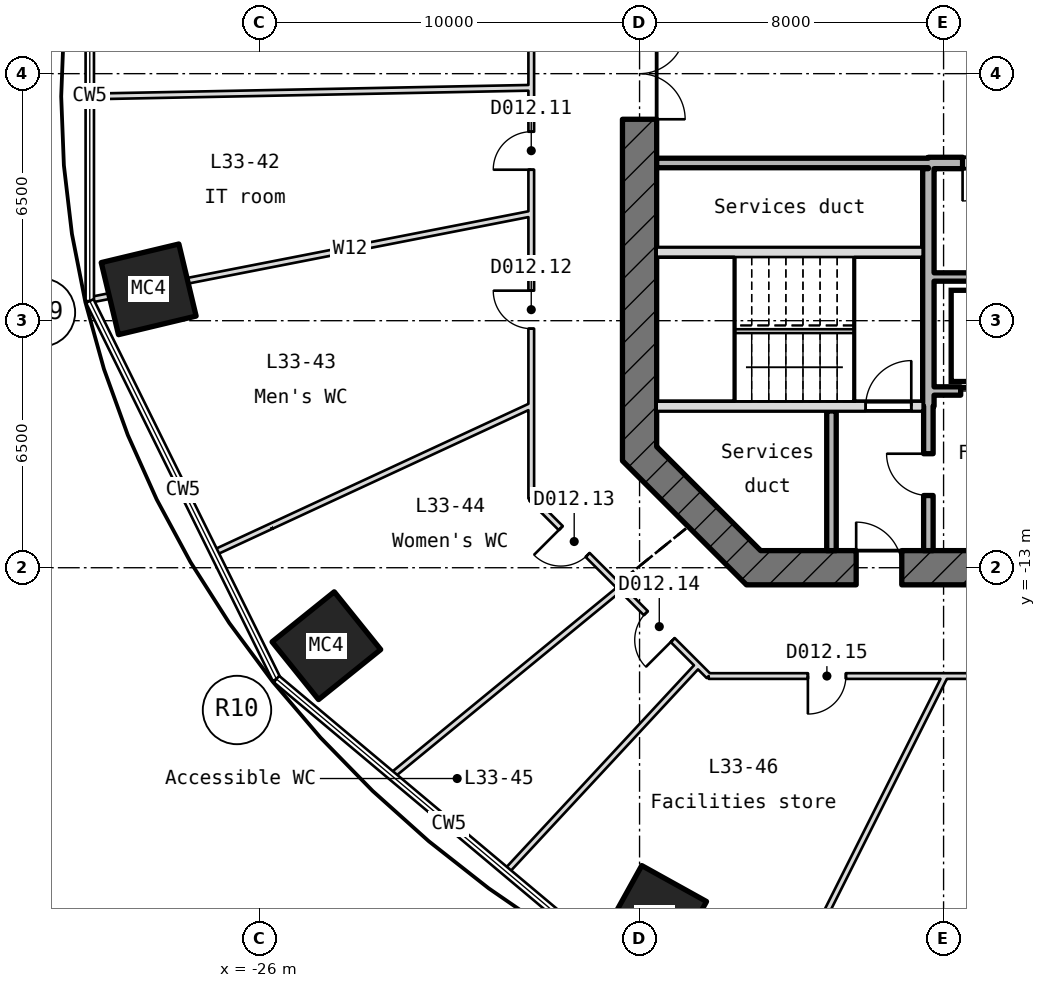
"""IFC4 building model, lengths in metres.
Left out: names, types, materials, properties, quantities, classifications, styles, units other than length and angle.
Written with IfcOpenShell. Run it as: python <this file> out.ifc"""

import sys

from ifc_helpers import new_model, si_unit, direction, frame, frame_2d, origin, origin_2d, place, context, subcontext, project, spatial, rectangle, hollow_rectangle, extrude, element, fill, save


model = new_model("IFC4")
c1 = context("Model", 3, precision=1e-05, world=origin(), true_north=direction((0.0, 1.0)))
c2 = subcontext(c1, "Body", "Model", "MODEL_VIEW")
j1 = project(units=[si_unit("LENGTHUNIT", "METRE"), si_unit("PLANEANGLEUNIT", "RADIAN")], contexts=[c1])
p1 = place(None, origin())
s1 = spatial("IfcSite", under=j1, at=p1, CompositionType="ELEMENT")
p2 = place(p1, origin())
s2 = spatial("IfcBuilding", under=s1, at=p2, CompositionType="ELEMENT")
p3 = place(p2, frame((0.0, 0.0, 155.65)))
s3 = spatial("IfcBuildingStorey", under=s2, at=p3, CompositionType="ELEMENT", Elevation=155.65)
for number, where, z_axis, x_axis in (
    (1, (-28.917, -5.675, -0.25), (0.0, 0.0, 1.0), (-0.233, 0.972, 0.0)),
    (2, (-24.241, -15.052, -0.25), (0.0, 0.0, 1.0), (-0.627, 0.779, 0.0)),
    (3, (-15.6, -22.228, -0.25), (0.0, 0.0, 1.0), (-0.874, 0.485, 0.0)),
):
    element("IfcColumn", number, at=place(p3, frame(where, z_axis=z_axis, x_axis=x_axis)), inside=s3, PredefinedType="COLUMN", context=c2, shape_type="SweptSolid", body=[
        extrude(hollow_rectangle(XDim=1.95, YDim=2.1, WallThickness=0.075, at=origin_2d()), origin(), (0.0, 0.0, 1.0), 5.47),
    ])
p4 = place(p3, frame((-16.0, 10.186, -0.25), z_axis=(0.0, 0.0, 1.0), x_axis=(0.0, -1.0, 0.0)))
e4 = element("IfcWall", 4, at=p4, inside=s3, PredefinedType="SHEAR", context=c2, shape_type="SweptSolid", body=[
    extrude(rectangle(XDim=20.373, YDim=0.9, at=frame_2d((10.186, 0.0))), origin(), (0.0, 0.0, 1.0), 5.47),
])
p5 = place(p4, frame((8.986, 0.0, 0.25)))
e5 = element("IfcOpeningElement", 5, at=p5, cuts=e4, PredefinedType="OPENING", context=c2, shape_type="SweptSolid", body=[
    extrude(rectangle(XDim=2.4, YDim=2.1, at=frame_2d((1.2, 1.05))), frame((0.0, 0.46, 0.0), z_axis=(0.0, -1.0, 0.0), x_axis=(1.0, 0.0, 0.0)), (0.0, 0.0, 1.0), 0.92),
])
p6 = place(p4, frame((5.586, 0.0, 0.25)))
e6 = element("IfcOpeningElement", 6, at=p6, cuts=e4, PredefinedType="OPENING", context=c2, shape_type="SweptSolid", body=[
    extrude(rectangle(XDim=1.2, YDim=2.1, at=frame_2d((0.6, 1.05))), frame((0.0, 0.46, 0.0), z_axis=(0.0, -1.0, 0.0), x_axis=(1.0, 0.0, 0.0)), (0.0, 0.0, 1.0), 0.92),
])
p7 = place(p3, frame((-16.132, -9.868, -0.25), z_axis=(0.0, 0.0, 1.0), x_axis=(0.707106781187, -0.707106781187, 0.0)))
e7 = element("IfcWall", 7, at=p7, inside=s3, PredefinedType="SHEAR", context=c2, shape_type="SweptSolid", body=[
    extrude(rectangle(XDim=4.615, YDim=0.9, at=frame_2d((2.308, 0.0))), origin(), (0.0, 0.0, 1.0), 5.47),
])
p8 = place(p3, frame((-13.186, -13.0, -0.25), z_axis=(0.0, 0.0, 1.0), x_axis=(1.0, 0.0, 0.0)))
e8 = element("IfcWall", 8, at=p8, inside=s3, PredefinedType="SHEAR", context=c2, shape_type="SweptSolid", body=[
    extrude(rectangle(XDim=26.373, YDim=0.9, at=frame_2d((13.186, 0.0))), origin(), (0.0, 0.0, 1.0), 5.47),
])
p9 = place(p8, frame((2.886, 0.0, 0.25)))
e9 = element("IfcOpeningElement", 9, at=p9, cuts=e8, PredefinedType="OPENING", context=c2, shape_type="SweptSolid", body=[
    extrude(rectangle(XDim=1.2, YDim=2.1, at=frame_2d((0.6, 1.05))), frame((0.0, 0.46, 0.0), z_axis=(0.0, -1.0, 0.0), x_axis=(1.0, 0.0, 0.0)), (0.0, 0.0, 1.0), 0.92),
])
p10 = place(p8, frame((6.886, 0.0, 0.25)))
e10 = element("IfcOpeningElement", 10, at=p10, cuts=e8, PredefinedType="OPENING", context=c2, shape_type="SweptSolid", body=[
    extrude(rectangle(XDim=1.4, YDim=2.1, at=frame_2d((0.7, 1.05))), frame((0.0, 0.46, 0.0), z_axis=(0.0, -1.0, 0.0), x_axis=(1.0, 0.0, 0.0)), (0.0, 0.0, 1.0), 0.92),
])
p11 = place(p8, frame((15.486, 0.0, 0.25)))
e11 = element("IfcOpeningElement", 11, at=p11, cuts=e8, PredefinedType="OPENING", context=c2, shape_type="SweptSolid", body=[
    extrude(rectangle(XDim=1.4, YDim=2.1, at=frame_2d((0.7, 1.05))), frame((0.0, 0.46, 0.0), z_axis=(0.0, -1.0, 0.0), x_axis=(1.0, 0.0, 0.0)), (0.0, 0.0, 1.0), 0.92),
])
p12 = place(p3, frame((-15.55, -8.75, -0.25), z_axis=(0.0, 0.0, 1.0), x_axis=(1.0, 0.0, 0.0)))
e12 = element("IfcWall", 12, at=p12, inside=s3, PredefinedType="SHEAR", context=c2, shape_type="SweptSolid", body=[
    extrude(rectangle(XDim=7.0, YDim=0.25, at=frame_2d((3.5, 0.0))), origin(), (0.0, 0.0, 1.0), 5.47),
])
p13 = place(p12, frame((5.5, 0.0, 0.25)))
e13 = element("IfcOpeningElement", 13, at=p13, cuts=e12, PredefinedType="OPENING", context=c2, shape_type="SweptSolid", body=[
    extrude(rectangle(XDim=1.2, YDim=2.1, at=frame_2d((0.6, 1.05))), frame((0.0, 0.135, 0.0), z_axis=(0.0, -1.0, 0.0), x_axis=(1.0, 0.0, 0.0)), (0.0, 0.0, 1.0), 0.27),
])
p14 = place(p3, frame((-8.25, -8.35, 0.0), z_axis=(0.0, 0.0, 1.0), x_axis=(1.0, 0.0, 0.0)))
e14 = element("IfcWall", 14, at=p14, inside=s3, PredefinedType="STANDARD", context=c2, shape_type="SweptSolid", body=[
    extrude(rectangle(XDim=5.34, YDim=0.22, at=frame_2d((2.67, 0.0))), origin(), (0.0, 0.0, 1.0), 5.22),
])
p15 = place(p14, frame((0.7, 0.0, 0.0)))
e15 = element("IfcOpeningElement", 15, at=p15, cuts=e14, PredefinedType="OPENING", context=c2, shape_type="SweptSolid", body=[
    extrude(rectangle(XDim=1.1, YDim=2.1, at=frame_2d((0.55, 1.05))), frame((0.0, 0.12, 0.0), z_axis=(0.0, -1.0, 0.0), x_axis=(1.0, 0.0, 0.0)), (0.0, 0.0, 1.0), 0.24),
])
p16 = place(p14, frame((3.5, 0.0, 0.0)))
e16 = element("IfcOpeningElement", 16, at=p16, cuts=e14, PredefinedType="OPENING", context=c2, shape_type="SweptSolid", body=[
    extrude(rectangle(XDim=1.1, YDim=2.1, at=frame_2d((0.55, 1.05))), frame((0.0, 0.12, 0.0), z_axis=(0.0, -1.0, 0.0), x_axis=(1.0, 0.0, 0.0)), (0.0, 0.0, 1.0), 0.24),
])
p17 = place(p3, frame((-8.25, -5.35, 0.0), z_axis=(0.0, 0.0, 1.0), x_axis=(1.0, 0.0, 0.0)))
e17 = element("IfcWall", 17, at=p17, inside=s3, PredefinedType="STANDARD", context=c2, shape_type="SweptSolid", body=[
    extrude(rectangle(XDim=16.5, YDim=0.22, at=frame_2d((8.25, 0.0))), origin(), (0.0, 0.0, 1.0), 5.22),
])
p18 = place(p3, frame((-15.55, -4.7, -0.25), z_axis=(0.0, 0.0, 1.0), x_axis=(1.0, 0.0, 0.0)))
e18 = element("IfcWall", 18, at=p18, inside=s3, PredefinedType="SHEAR", context=c2, shape_type="SweptSolid", body=[
    extrude(rectangle(XDim=7.0, YDim=0.25, at=frame_2d((3.5, 0.0))), origin(), (0.0, 0.0, 1.0), 5.47),
])
p19 = place(p3, frame((-15.55, -2.35, 0.0), z_axis=(0.0, 0.0, 1.0), x_axis=(1.0, 0.0, 0.0)))
e19 = element("IfcWall", 19, at=p19, inside=s3, PredefinedType="STANDARD", context=c2, shape_type="SweptSolid", body=[
    extrude(rectangle(XDim=7.15, YDim=0.25, at=frame_2d((3.575, 0.0))), origin(), (0.0, 0.0, 1.0), 5.22),
])
p20 = place(p3, frame((-8.4, -2.35, -0.25), z_axis=(0.0, 0.0, 1.0), x_axis=(1.0, 0.0, 0.0)))
e20 = element("IfcWall", 20, at=p20, inside=s3, PredefinedType="SHEAR", context=c2, shape_type="SweptSolid", body=[
    extrude(rectangle(XDim=16.8, YDim=0.3, at=frame_2d((8.4, 0.0))), origin(), (0.0, 0.0, 1.0), 5.47),
])
p21 = place(p20, frame((0.9, 0.0, 0.25)))
e21 = element("IfcOpeningElement", 21, at=p21, cuts=e20, PredefinedType="OPENING", context=c2, shape_type="SweptSolid", body=[
    extrude(rectangle(XDim=1.0, YDim=2.1, at=frame_2d((0.5, 1.05))), frame((0.0, 0.16, 0.0), z_axis=(0.0, -1.0, 0.0), x_axis=(1.0, 0.0, 0.0)), (0.0, 0.0, 1.0), 0.32),
])
p22 = place(p20, frame((14.9, 0.0, 0.25)))
e22 = element("IfcOpeningElement", 22, at=p22, cuts=e20, PredefinedType="OPENING", context=c2, shape_type="SweptSolid", body=[
    extrude(rectangle(XDim=1.0, YDim=2.1, at=frame_2d((0.5, 1.05))), frame((0.0, 0.16, 0.0), z_axis=(0.0, -1.0, 0.0), x_axis=(1.0, 0.0, 0.0)), (0.0, 0.0, 1.0), 0.32),
])
p23 = place(p3, frame((-10.95, -12.55, 0.0), z_axis=(0.0, 0.0, 1.0), x_axis=(0.0, 1.0, 0.0)))
e23 = element("IfcWall", 23, at=p23, inside=s3, PredefinedType="STANDARD", context=c2, shape_type="SweptSolid", body=[
    extrude(rectangle(XDim=3.675, YDim=0.25, at=frame_2d((1.837, 0.0))), origin(), (0.0, 0.0, 1.0), 5.22),
])
p24 = place(p3, frame((-8.4, -12.55, 0.0), z_axis=(0.0, 0.0, 1.0), x_axis=(0.0, 1.0, 0.0)))
e24 = element("IfcWall", 24, at=p24, inside=s3, PredefinedType="STANDARD", context=c2, shape_type="SweptSolid", body=[
    extrude(rectangle(XDim=3.8, YDim=0.25, at=frame_2d((1.9, 0.0))), origin(), (0.0, 0.0, 1.0), 5.22),
])
p25 = place(p24, frame((1.45, 0.0, 0.0)))
e25 = element("IfcOpeningElement", 25, at=p25, cuts=e24, PredefinedType="OPENING", context=c2, shape_type="SweptSolid", body=[
    extrude(rectangle(XDim=1.1, YDim=2.1, at=frame_2d((0.55, 1.05))), frame((0.0, 0.135, 0.0), z_axis=(0.0, -1.0, 0.0), x_axis=(1.0, 0.0, 0.0)), (0.0, 0.0, 1.0), 0.27),
])
p26 = place(p3, frame((-8.4, -8.75, -0.25), z_axis=(0.0, 0.0, 1.0), x_axis=(0.0, 1.0, 0.0)))
e26 = element("IfcWall", 26, at=p26, inside=s3, PredefinedType="SHEAR", context=c2, shape_type="SweptSolid", body=[
    extrude(rectangle(XDim=6.25, YDim=0.3, at=frame_2d((3.125, 0.0))), origin(), (0.0, 0.0, 1.0), 5.47),
])
p27 = place(p3, frame((-14.18, -15.85, 0.0), z_axis=(0.0, 0.0, 1.0), x_axis=(1.0, 0.0, 0.0)))
e27 = element("IfcWall", 27, at=p27, inside=s3, PredefinedType="PARTITIONING", context=c2, shape_type="SweptSolid", body=[
    extrude(rectangle(XDim=28.361, YDim=0.15, at=frame_2d((14.18, 0.0))), origin(), (0.0, 0.0, 1.0), 5.22),
])
p28 = place(p27, frame((2.61, 0.0, 0.0)))
e28 = element("IfcOpeningElement", 28, at=p28, cuts=e27, PredefinedType="OPENING", context=c2, shape_type="SweptSolid", body=[
    extrude(rectangle(XDim=1.0, YDim=2.1, at=frame_2d((0.5, 1.05))), frame((0.0, 0.085, 0.0), z_axis=(0.0, -1.0, 0.0), x_axis=(1.0, 0.0, 0.0)), (0.0, 0.0, 1.0), 0.17),
])
p29 = place(p27, frame((8.368, 0.0, 0.0)))
e29 = element("IfcOpeningElement", 29, at=p29, cuts=e27, PredefinedType="OPENING", context=c2, shape_type="SweptSolid", body=[
    extrude(rectangle(XDim=1.0, YDim=2.1, at=frame_2d((0.5, 1.05))), frame((0.0, 0.085, 0.0), z_axis=(0.0, -1.0, 0.0), x_axis=(1.0, 0.0, 0.0)), (0.0, 0.0, 1.0), 0.17),
])
p30 = place(p27, frame((13.475, 0.0, 0.0)))
e30 = element("IfcOpeningElement", 30, at=p30, cuts=e27, PredefinedType="OPENING", context=c2, shape_type="SweptSolid", body=[
    extrude(rectangle(XDim=1.0, YDim=2.1, at=frame_2d((0.5, 1.05))), frame((0.0, 0.085, 0.0), z_axis=(0.0, -1.0, 0.0), x_axis=(1.0, 0.0, 0.0)), (0.0, 0.0, 1.0), 0.17),
])
p31 = place(p27, frame((18.479, 0.0, 0.0)))
e31 = element("IfcOpeningElement", 31, at=p31, cuts=e27, PredefinedType="OPENING", context=c2, shape_type="SweptSolid", body=[
    extrude(rectangle(XDim=1.0, YDim=2.1, at=frame_2d((0.5, 1.05))), frame((0.0, 0.085, 0.0), z_axis=(0.0, -1.0, 0.0), x_axis=(1.0, 0.0, 0.0)), (0.0, 0.0, 1.0), 0.17),
])
p32 = place(p27, frame((24.443, 0.0, 0.0)))
e32 = element("IfcOpeningElement", 32, at=p32, cuts=e27, PredefinedType="OPENING", context=c2, shape_type="SweptSolid", body=[
    extrude(rectangle(XDim=1.0, YDim=2.1, at=frame_2d((0.5, 1.05))), frame((0.0, 0.085, 0.0), z_axis=(0.0, -1.0, 0.0), x_axis=(1.0, 0.0, 0.0)), (0.0, 0.0, 1.0), 0.17),
])
p33 = place(p3, frame((-30.447, -0.6, 0.0), z_axis=(0.0, 0.0, 1.0), x_axis=(0.999805915994, 0.019701023923, 0.0)))
e33 = element("IfcWall", 33, at=p33, inside=s3, PredefinedType="PARTITIONING", context=c2, shape_type="SweptSolid", body=[
    extrude(rectangle(XDim=11.599, YDim=0.15, at=frame_2d((5.8, 0.0))), origin(), (0.0, 0.0, 1.0), 5.22),
])
p34 = place(p3, frame((-11.767, -23.429, 0.0), z_axis=(0.0, 0.0, 1.0), x_axis=(0.448824965696, 0.893619689895, 0.0)))
e34 = element("IfcWall", 34, at=p34, inside=s3, PredefinedType="PARTITIONING", context=c2, shape_type="SweptSolid", body=[
    extrude(rectangle(XDim=8.481, YDim=0.15, at=frame_2d((4.24, 0.0))), origin(), (0.0, 0.0, 1.0), 4.684),
])
p35 = place(p3, frame((-18.85, -3.688, 0.0), z_axis=(0.0, 0.0, 1.0), x_axis=(0.0, 1.0, 0.0)))
e35 = element("IfcWall", 35, at=p35, inside=s3, PredefinedType="PARTITIONING", context=c2, shape_type="SweptSolid", body=[
    extrude(rectangle(XDim=11.598, YDim=0.15, at=frame_2d((5.799, 0.0))), origin(), (0.0, 0.0, 1.0), 5.22),
])
p36 = place(p35, frame((8.629, 0.0, 0.0)))
e36 = element("IfcOpeningElement", 36, at=p36, cuts=e35, PredefinedType="OPENING", context=c2, shape_type="SweptSolid", body=[
    extrude(rectangle(XDim=1.0, YDim=2.1, at=frame_2d((0.5, 1.05))), frame((0.0, 0.085, 0.0), z_axis=(0.0, -1.0, 0.0), x_axis=(1.0, 0.0, 0.0)), (0.0, 0.0, 1.0), 0.17),
])
p37 = place(p35, frame((4.491, 0.0, 0.0)))
e37 = element("IfcOpeningElement", 37, at=p37, cuts=e35, PredefinedType="OPENING", context=c2, shape_type="SweptSolid", body=[
    extrude(rectangle(XDim=1.0, YDim=2.1, at=frame_2d((0.5, 1.05))), frame((0.0, 0.085, 0.0), z_axis=(0.0, -1.0, 0.0), x_axis=(1.0, 0.0, 0.0)), (0.0, 0.0, 1.0), 0.17),
])
p38 = place(p35, frame((1.161, 0.0, 0.0)))
e38 = element("IfcOpeningElement", 38, at=p38, cuts=e35, PredefinedType="OPENING", context=c2, shape_type="SweptSolid", body=[
    extrude(rectangle(XDim=1.0, YDim=2.1, at=frame_2d((0.5, 1.05))), frame((0.0, 0.085, 0.0), z_axis=(0.0, -1.0, 0.0), x_axis=(1.0, 0.0, 0.0)), (0.0, 0.0, 1.0), 0.17),
])
p39 = place(p3, frame((-14.18, -15.85, 0.0), z_axis=(0.0, 0.0, 1.0), x_axis=(-0.707106781187, 0.707106781187, 0.0)))
e39 = element("IfcWall", 39, at=p39, inside=s3, PredefinedType="PARTITIONING", context=c2, shape_type="SweptSolid", body=[
    extrude(rectangle(XDim=0.406, YDim=0.15, at=frame_2d((0.203, 0.0))), origin(), (0.0, 0.0, 1.0), 5.22),
])
p40 = place(p3, frame((-30.447, -5.949, 0.0), z_axis=(0.0, 0.0, 1.0), x_axis=(0.981449626538, 0.191720188214, 0.0)))
e40 = element("IfcWall", 40, at=p40, inside=s3, PredefinedType="PARTITIONING", context=c2, shape_type="SweptSolid", body=[
    extrude(rectangle(XDim=2.105, YDim=0.15, at=frame_2d((1.052, 0.0))), origin(), (0.0, 0.0, 1.0), 5.22),
])
p41 = place(p3, frame((-28.381, -5.545, 0.0), z_axis=(0.0, 0.0, 1.0), x_axis=(0.981440307059, 0.191767890116, 0.0)))
e41 = element("IfcWall", 41, at=p41, inside=s3, PredefinedType="PARTITIONING", context=c2, shape_type="SweptSolid", body=[
    extrude(rectangle(XDim=9.711, YDim=0.15, at=frame_2d((4.855, 0.0))), origin(), (0.0, 0.0, 1.0), 4.608),
])
p42 = place(p3, frame((-27.178, -12.596, 0.0), z_axis=(0.0, 0.0, 1.0), x_axis=(0.907321696226, 0.420437081568, 0.0)))
e42 = element("IfcWall", 42, at=p42, inside=s3, PredefinedType="PARTITIONING", context=c2, shape_type="SweptSolid", body=[
    extrude(rectangle(XDim=1.639, YDim=0.15, at=frame_2d((0.819, 0.0))), origin(), (0.0, 0.0, 1.0), 5.22),
])
p43 = place(p3, frame((-25.691, -11.907, 0.0), z_axis=(0.0, 0.0, 1.0), x_axis=(0.90728349123, 0.420519519809, 0.0)))
e43 = element("IfcWall", 43, at=p43, inside=s3, PredefinedType="PARTITIONING", context=c2, shape_type="SweptSolid", body=[
    extrude(rectangle(XDim=7.541, YDim=0.15, at=frame_2d((3.77, 0.0))), origin(), (0.0, 0.0, 1.0), 4.684),
])
p44 = place(p3, frame((-22.506, -18.46, 0.0), z_axis=(0.0, 0.0, 1.0), x_axis=(0.773199383517, 0.634163002175, 0.0)))
e44 = element("IfcWall", 44, at=p44, inside=s3, PredefinedType="PARTITIONING", context=c2, shape_type="SweptSolid", body=[
    extrude(rectangle(XDim=7.77, YDim=0.15, at=frame_2d((3.885, 0.0))), origin(), (0.0, 0.0, 1.0), 5.22),
])
p45 = place(p3, frame((-19.497, -20.983, 0.0), z_axis=(0.0, 0.0, 1.0), x_axis=(0.680679019614, 0.732581785371, 0.0)))
e45 = element("IfcWall", 45, at=p45, inside=s3, PredefinedType="PARTITIONING", context=c2, shape_type="SweptSolid", body=[
    extrude(rectangle(XDim=7.394, YDim=0.15, at=frame_2d((3.697, 0.0))), origin(), (0.0, 0.0, 1.0), 5.22),
])
p46 = place(p3, frame((-18.85, -11.18, 0.0), z_axis=(0.0, 0.0, 1.0), x_axis=(0.0, 1.0, 0.0)))
e46 = element("IfcWall", 46, at=p46, inside=s3, PredefinedType="PARTITIONING", context=c2, shape_type="SweptSolid", body=[
    extrude(rectangle(XDim=7.502, YDim=0.15, at=frame_2d((3.751, 0.0))), origin(), (0.0, 0.0, 1.0), 5.22),
])
p47 = place(p46, frame((4.471, 0.0, 0.0)))
e47 = element("IfcOpeningElement", 47, at=p47, cuts=e46, PredefinedType="OPENING", context=c2, shape_type="SweptSolid", body=[
    extrude(rectangle(XDim=1.0, YDim=2.1, at=frame_2d((0.5, 1.05))), frame((0.0, 0.085, 0.0), z_axis=(0.0, -1.0, 0.0), x_axis=(1.0, 0.0, 0.0)), (0.0, 0.0, 1.0), 0.17),
])
p48 = place(p3, frame((-14.46, -15.57, 0.0), z_axis=(0.0, 0.0, 1.0), x_axis=(-0.707106781187, 0.707106781187, 0.0)))
e48 = element("IfcWall", 48, at=p48, inside=s3, PredefinedType="PARTITIONING", context=c2, shape_type="SweptSolid", body=[
    extrude(rectangle(XDim=6.208, YDim=0.15, at=frame_2d((3.104, 0.0))), origin(), (0.0, 0.0, 1.0), 5.22),
])
p49 = place(p48, frame((4.11, 0.0, 0.0)))
e49 = element("IfcOpeningElement", 49, at=p49, cuts=e48, PredefinedType="OPENING", context=c2, shape_type="SweptSolid", body=[
    extrude(rectangle(XDim=1.0, YDim=2.1, at=frame_2d((0.5, 1.05))), frame((0.0, 0.085, 0.0), z_axis=(0.0, -1.0, 0.0), x_axis=(1.0, 0.0, 0.0)), (0.0, 0.0, 1.0), 0.17),
])
p50 = place(p48, frame((0.943, 0.0, 0.0)))
e50 = element("IfcOpeningElement", 50, at=p50, cuts=e48, PredefinedType="OPENING", context=c2, shape_type="SweptSolid", body=[
    extrude(rectangle(XDim=1.0, YDim=2.1, at=frame_2d((0.5, 1.05))), frame((0.0, 0.085, 0.0), z_axis=(0.0, -1.0, 0.0), x_axis=(1.0, 0.0, 0.0)), (0.0, 0.0, 1.0), 0.17),
])
p51 = place(p15, origin())
e51 = element("IfcDoor", 51, at=p51, inside=s3, OperationType="DOUBLE_DOOR_SLIDING", PredefinedType="DOOR", context=c2, shape_type="SweptSolid", body=[
    extrude(rectangle(XDim=1.1, YDim=2.1, at=frame_2d((0.55, 1.05))), frame((0.0, 0.025, 0.0), z_axis=(0.0, -1.0, 0.0), x_axis=(1.0, 0.0, 0.0)), (0.0, 0.0, 1.0), 0.05),
])
fill(e15, e51)
p52 = place(p13, origin())
e52 = element("IfcDoor", 52, at=p52, inside=s3, OperationType="SINGLE_SWING_RIGHT", PredefinedType="DOOR", context=c2, shape_type="SweptSolid", body=[
    extrude(rectangle(XDim=1.2, YDim=2.1, at=frame_2d((0.6, 1.05))), frame((0.0, 0.025, 0.0), z_axis=(0.0, -1.0, 0.0), x_axis=(1.0, 0.0, 0.0)), (0.0, 0.0, 1.0), 0.05),
])
fill(e13, e52)
p53 = place(p25, origin())
e53 = element("IfcDoor", 53, at=p53, inside=s3, OperationType="SINGLE_SWING_RIGHT", PredefinedType="DOOR", context=c2, shape_type="SweptSolid", body=[
    extrude(rectangle(XDim=1.1, YDim=2.1, at=frame_2d((0.55, 1.05))), frame((0.0, 0.025, 0.0), z_axis=(0.0, -1.0, 0.0), x_axis=(1.0, 0.0, 0.0)), (0.0, 0.0, 1.0), 0.05),
])
fill(e25, e53)
p54 = place(p5, origin())
e54 = element("IfcDoor", 54, at=p54, inside=s3, OperationType="DOUBLE_DOOR_SINGLE_SWING", PredefinedType="DOOR", context=c2, shape_type="SweptSolid", body=[
    extrude(rectangle(XDim=2.4, YDim=2.1, at=frame_2d((1.2, 1.05))), frame((0.0, 0.025, 0.0), z_axis=(0.0, -1.0, 0.0), x_axis=(1.0, 0.0, 0.0)), (0.0, 0.0, 1.0), 0.05),
])
fill(e5, e54)
p55 = place(p9, origin())
e55 = element("IfcDoor", 55, at=p55, inside=s3, OperationType="SINGLE_SWING_RIGHT", PredefinedType="DOOR", context=c2, shape_type="SweptSolid", body=[
    extrude(rectangle(XDim=1.2, YDim=2.1, at=frame_2d((0.6, 1.05))), frame((0.0, 0.025, 0.0), z_axis=(0.0, -1.0, 0.0), x_axis=(1.0, 0.0, 0.0)), (0.0, 0.0, 1.0), 0.05),
])
fill(e9, e55)
p56 = place(p21, frame((1.0, 0.0, 0.0), z_axis=(0.0, 0.0, 1.0), x_axis=(-1.0, 0.0, 0.0)))
e56 = element("IfcDoor", 56, at=p56, inside=s3, OperationType="SINGLE_SWING_LEFT", PredefinedType="DOOR", context=c2, shape_type="SweptSolid", body=[
    extrude(rectangle(XDim=1.0, YDim=2.1, at=frame_2d((0.5, 1.05))), frame((0.0, 0.025, 0.0), z_axis=(0.0, -1.0, 0.0), x_axis=(1.0, 0.0, 0.0)), (0.0, 0.0, 1.0), 0.05),
])
fill(e21, e56)
p57 = place(p38, origin())
e57 = element("IfcDoor", 57, at=p57, inside=s3, OperationType="SINGLE_SWING_RIGHT", PredefinedType="DOOR", context=c2, shape_type="SweptSolid", body=[
    extrude(rectangle(XDim=1.0, YDim=2.1, at=frame_2d((0.5, 1.05))), frame((0.0, 0.025, 0.0), z_axis=(0.0, -1.0, 0.0), x_axis=(1.0, 0.0, 0.0)), (0.0, 0.0, 1.0), 0.05),
])
fill(e38, e57)
p58 = place(p47, origin())
e58 = element("IfcDoor", 58, at=p58, inside=s3, OperationType="SINGLE_SWING_RIGHT", PredefinedType="DOOR", context=c2, shape_type="SweptSolid", body=[
    extrude(rectangle(XDim=1.0, YDim=2.1, at=frame_2d((0.5, 1.05))), frame((0.0, 0.025, 0.0), z_axis=(0.0, -1.0, 0.0), x_axis=(1.0, 0.0, 0.0)), (0.0, 0.0, 1.0), 0.05),
])
fill(e47, e58)
p59 = place(p49, origin())
e59 = element("IfcDoor", 59, at=p59, inside=s3, OperationType="SINGLE_SWING_RIGHT", PredefinedType="DOOR", context=c2, shape_type="SweptSolid", body=[
    extrude(rectangle(XDim=1.0, YDim=2.1, at=frame_2d((0.5, 1.05))), frame((0.0, 0.025, 0.0), z_axis=(0.0, -1.0, 0.0), x_axis=(1.0, 0.0, 0.0)), (0.0, 0.0, 1.0), 0.05),
])
fill(e49, e59)
p60 = place(p50, origin())
e60 = element("IfcDoor", 60, at=p60, inside=s3, OperationType="SINGLE_SWING_RIGHT", PredefinedType="DOOR", context=c2, shape_type="SweptSolid", body=[
    extrude(rectangle(XDim=1.0, YDim=2.1, at=frame_2d((0.5, 1.05))), frame((0.0, 0.025, 0.0), z_axis=(0.0, -1.0, 0.0), x_axis=(1.0, 0.0, 0.0)), (0.0, 0.0, 1.0), 0.05),
])
fill(e50, e60)
p61 = place(p28, frame((1.0, 0.0, 0.0), z_axis=(0.0, 0.0, 1.0), x_axis=(-1.0, 0.0, 0.0)))
e61 = element("IfcDoor", 61, at=p61, inside=s3, OperationType="SINGLE_SWING_LEFT", PredefinedType="DOOR", context=c2, shape_type="SweptSolid", body=[
    extrude(rectangle(XDim=1.0, YDim=2.1, at=frame_2d((0.5, 1.05))), frame((0.0, 0.025, 0.0), z_axis=(0.0, -1.0, 0.0), x_axis=(1.0, 0.0, 0.0)), (0.0, 0.0, 1.0), 0.05),
])
fill(e28, e61)
save(model, sys.argv[1])
